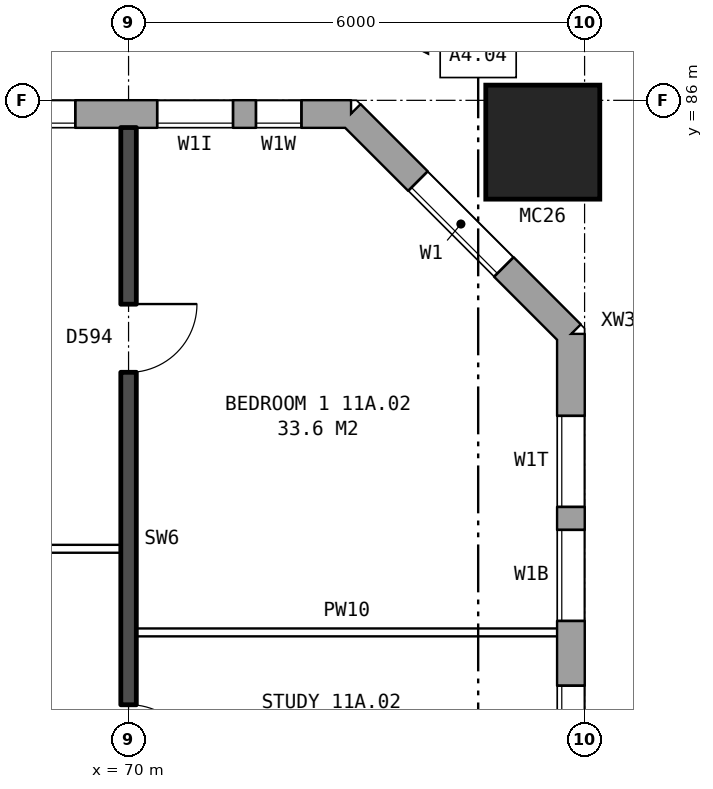
"""IFC4 building model, lengths in metres.
Left out: names, types, materials, properties, quantities, classifications, styles, units other than length and angle.
Written with IfcOpenShell. Run it as: python <this file> out.ifc"""

import sys

from ifc_helpers import new_model, si_unit, direction, frame, frame_2d, origin, origin_2d, place, context, subcontext, project, spatial, rectangle, hollow_rectangle, extrude, element, fill, save


model = new_model("IFC4")
c1 = context("Model", 3, precision=1e-05, world=origin(), true_north=direction((0.0, 1.0)))
c2 = subcontext(c1, "Body", "Model", "MODEL_VIEW")
j1 = project(units=[si_unit("LENGTHUNIT", "METRE"), si_unit("PLANEANGLEUNIT", "RADIAN")], contexts=[c1])
p1 = place(None, origin())
s1 = spatial("IfcSite", under=j1, at=p1, CompositionType="ELEMENT")
p2 = place(p1, origin())
s2 = spatial("IfcBuilding", under=s1, at=p2, CompositionType="ELEMENT")
p3 = place(p2, frame((0.0, 0.0, 44.3)))
s3 = spatial("IfcBuildingStorey", under=s2, at=p3, CompositionType="ELEMENT", Elevation=44.3)
p4 = place(p3, frame((75.45, 85.45, 0.0), z_axis=(0.0, 0.0, 1.0), x_axis=(1.0, 0.0, 0.0)))
e1 = element("IfcColumn", 1, at=p4, inside=s3, PredefinedType="COLUMN", context=c2, shape_type="SweptSolid", body=[
    extrude(hollow_rectangle(XDim=1.5, YDim=1.5, WallThickness=0.08, at=origin_2d()), origin(), (0.0, 0.0, 1.0), 3.1),
])
p5 = place(p3, frame((75.82, 57.075, 0.0), z_axis=(0.0, 0.0, 1.0), x_axis=(0.0, 1.0, 0.0)))
e2 = element("IfcWall", 2, at=p5, inside=s3, PredefinedType="STANDARD", context=c2, shape_type="SweptSolid", body=[
    extrude(rectangle(XDim=25.851, YDim=0.36, at=frame_2d((12.925, 0.0))), origin(), (0.0, 0.0, 1.0), 2.85),
])
p6 = place(p5, frame((1.475, 0.0, 0.8)))
e3 = element("IfcOpeningElement", 3, at=p6, cuts=e2, PredefinedType="OPENING", context=c2, shape_type="SweptSolid", body=[
    extrude(rectangle(XDim=1.0, YDim=1.2, at=frame_2d((0.5, 0.6))), frame((0.0, 0.19, 0.0), z_axis=(0.0, -1.0, 0.0), x_axis=(1.0, 0.0, 0.0)), (0.0, 0.0, 1.0), 0.38),
])
p7 = place(p5, frame((4.625, 0.0, 0.8)))
e4 = element("IfcOpeningElement", 4, at=p7, cuts=e2, PredefinedType="OPENING", context=c2, shape_type="SweptSolid", body=[
    extrude(rectangle(XDim=1.6, YDim=1.8, at=frame_2d((0.8, 0.9))), frame((0.0, 0.19, 0.0), z_axis=(0.0, -1.0, 0.0), x_axis=(1.0, 0.0, 0.0)), (0.0, 0.0, 1.0), 0.38),
])
p8 = place(p5, frame((19.625, 0.0, 0.8)))
e5 = element("IfcOpeningElement", 5, at=p8, cuts=e2, PredefinedType="OPENING", context=c2, shape_type="SweptSolid", body=[
    extrude(rectangle(XDim=1.6, YDim=1.8, at=frame_2d((0.8, 0.9))), frame((0.0, 0.19, 0.0), z_axis=(0.0, -1.0, 0.0), x_axis=(1.0, 0.0, 0.0)), (0.0, 0.0, 1.0), 0.38),
])
p9 = place(p5, frame((22.075, 0.0, 0.8)))
e6 = element("IfcOpeningElement", 6, at=p9, cuts=e2, PredefinedType="OPENING", context=c2, shape_type="SweptSolid", body=[
    extrude(rectangle(XDim=1.2, YDim=1.8, at=frame_2d((0.6, 0.9))), frame((0.0, 0.19, 0.0), z_axis=(0.0, -1.0, 0.0), x_axis=(1.0, 0.0, 0.0)), (0.0, 0.0, 1.0), 0.38),
])
p10 = place(p5, frame((2.775, 0.0, 0.8)))
e7 = element("IfcOpeningElement", 7, at=p10, cuts=e2, PredefinedType="OPENING", context=c2, shape_type="SweptSolid", body=[
    extrude(rectangle(XDim=1.4, YDim=1.8, at=frame_2d((0.7, 0.9))), frame((0.0, 0.19, 0.0), z_axis=(0.0, -1.0, 0.0), x_axis=(1.0, 0.0, 0.0)), (0.0, 0.0, 1.0), 0.38),
])
p11 = place(p5, frame((23.575, 0.0, 0.8)))
e8 = element("IfcOpeningElement", 8, at=p11, cuts=e2, PredefinedType="OPENING", context=c2, shape_type="SweptSolid", body=[
    extrude(rectangle(XDim=1.2, YDim=0.9, at=frame_2d((0.6, 0.45))), frame((0.0, 0.19, 0.0), z_axis=(0.0, -1.0, 0.0), x_axis=(1.0, 0.0, 0.0)), (0.0, 0.0, 1.0), 0.38),
])
p12 = place(p3, frame((75.82, 82.925, 0.0), z_axis=(0.0, 0.0, 1.0), x_axis=(-0.707106781187, 0.707106781187, 0.0)))
e9 = element("IfcWall", 9, at=p12, inside=s3, PredefinedType="STANDARD", context=c2, shape_type="SweptSolid", body=[
    extrude(rectangle(XDim=4.094, YDim=0.36, at=frame_2d((2.047, 0.0))), origin(), (0.0, 0.0, 1.0), 2.85),
])
p13 = place(p12, frame((1.247, 0.0, 0.8)))
e10 = element("IfcOpeningElement", 10, at=p13, cuts=e9, PredefinedType="OPENING", context=c2, shape_type="SweptSolid", body=[
    extrude(rectangle(XDim=1.6, YDim=1.8, at=frame_2d((0.8, 0.9))), frame((0.0, 0.19, 0.0), z_axis=(0.0, -1.0, 0.0), x_axis=(1.0, 0.0, 0.0)), (0.0, 0.0, 1.0), 0.38),
])
p14 = place(p3, frame((72.925, 85.82, 0.0), z_axis=(0.0, 0.0, 1.0), x_axis=(-1.0, 0.0, 0.0)))
e11 = element("IfcWall", 11, at=p14, inside=s3, PredefinedType="STANDARD", context=c2, shape_type="SweptSolid", body=[
    extrude(rectangle(XDim=48.351, YDim=0.36, at=frame_2d((24.175, 0.0))), origin(), (0.0, 0.0, 1.0), 2.85),
])
p15 = place(p14, frame((0.65, 0.0, 0.8)))
e12 = element("IfcOpeningElement", 12, at=p15, cuts=e11, PredefinedType="OPENING", context=c2, shape_type="SweptSolid", body=[
    extrude(rectangle(XDim=0.6, YDim=0.9, at=frame_2d((0.3, 0.45))), frame((0.0, 0.19, 0.0), z_axis=(0.0, -1.0, 0.0), x_axis=(1.0, 0.0, 0.0)), (0.0, 0.0, 1.0), 0.38),
])
p16 = place(p14, frame((3.625, 0.0, 0.8)))
e13 = element("IfcOpeningElement", 13, at=p16, cuts=e11, PredefinedType="OPENING", context=c2, shape_type="SweptSolid", body=[
    extrude(rectangle(XDim=1.6, YDim=1.8, at=frame_2d((0.8, 0.9))), frame((0.0, 0.19, 0.0), z_axis=(0.0, -1.0, 0.0), x_axis=(1.0, 0.0, 0.0)), (0.0, 0.0, 1.0), 0.38),
])
p17 = place(p14, frame((6.625, 0.0, 0.8)))
e14 = element("IfcOpeningElement", 14, at=p17, cuts=e11, PredefinedType="OPENING", context=c2, shape_type="SweptSolid", body=[
    extrude(rectangle(XDim=1.6, YDim=1.8, at=frame_2d((0.8, 0.9))), frame((0.0, 0.19, 0.0), z_axis=(0.0, -1.0, 0.0), x_axis=(1.0, 0.0, 0.0)), (0.0, 0.0, 1.0), 0.38),
])
p18 = place(p14, frame((9.625, 0.0, 0.8)))
e15 = element("IfcOpeningElement", 15, at=p18, cuts=e11, PredefinedType="OPENING", context=c2, shape_type="SweptSolid", body=[
    extrude(rectangle(XDim=1.6, YDim=1.8, at=frame_2d((0.8, 0.9))), frame((0.0, 0.19, 0.0), z_axis=(0.0, -1.0, 0.0), x_axis=(1.0, 0.0, 0.0)), (0.0, 0.0, 1.0), 0.38),
])
p19 = place(p14, frame((12.625, 0.0, 0.8)))
e16 = element("IfcOpeningElement", 16, at=p19, cuts=e11, PredefinedType="OPENING", context=c2, shape_type="SweptSolid", body=[
    extrude(rectangle(XDim=1.6, YDim=1.8, at=frame_2d((0.8, 0.9))), frame((0.0, 0.19, 0.0), z_axis=(0.0, -1.0, 0.0), x_axis=(1.0, 0.0, 0.0)), (0.0, 0.0, 1.0), 0.38),
])
p20 = place(p14, frame((15.625, 0.0, 0.8)))
e17 = element("IfcOpeningElement", 17, at=p20, cuts=e11, PredefinedType="OPENING", context=c2, shape_type="SweptSolid", body=[
    extrude(rectangle(XDim=1.6, YDim=1.8, at=frame_2d((0.8, 0.9))), frame((0.0, 0.19, 0.0), z_axis=(0.0, -1.0, 0.0), x_axis=(1.0, 0.0, 0.0)), (0.0, 0.0, 1.0), 0.38),
])
p21 = place(p14, frame((18.625, 0.0, 0.8)))
e18 = element("IfcOpeningElement", 18, at=p21, cuts=e11, PredefinedType="OPENING", context=c2, shape_type="SweptSolid", body=[
    extrude(rectangle(XDim=1.6, YDim=1.8, at=frame_2d((0.8, 0.9))), frame((0.0, 0.19, 0.0), z_axis=(0.0, -1.0, 0.0), x_axis=(1.0, 0.0, 0.0)), (0.0, 0.0, 1.0), 0.38),
])
p22 = place(p14, frame((21.625, 0.0, 0.8)))
e19 = element("IfcOpeningElement", 19, at=p22, cuts=e11, PredefinedType="OPENING", context=c2, shape_type="SweptSolid", body=[
    extrude(rectangle(XDim=1.6, YDim=1.8, at=frame_2d((0.8, 0.9))), frame((0.0, 0.19, 0.0), z_axis=(0.0, -1.0, 0.0), x_axis=(1.0, 0.0, 0.0)), (0.0, 0.0, 1.0), 0.38),
])
p23 = place(p14, frame((24.625, 0.0, 0.8)))
e20 = element("IfcOpeningElement", 20, at=p23, cuts=e11, PredefinedType="OPENING", context=c2, shape_type="SweptSolid", body=[
    extrude(rectangle(XDim=1.6, YDim=1.8, at=frame_2d((0.8, 0.9))), frame((0.0, 0.19, 0.0), z_axis=(0.0, -1.0, 0.0), x_axis=(1.0, 0.0, 0.0)), (0.0, 0.0, 1.0), 0.38),
])
p24 = place(p14, frame((27.625, 0.0, 0.8)))
e21 = element("IfcOpeningElement", 21, at=p24, cuts=e11, PredefinedType="OPENING", context=c2, shape_type="SweptSolid", body=[
    extrude(rectangle(XDim=1.6, YDim=1.8, at=frame_2d((0.8, 0.9))), frame((0.0, 0.19, 0.0), z_axis=(0.0, -1.0, 0.0), x_axis=(1.0, 0.0, 0.0)), (0.0, 0.0, 1.0), 0.38),
])
p25 = place(p14, frame((30.625, 0.0, 0.8)))
e22 = element("IfcOpeningElement", 22, at=p25, cuts=e11, PredefinedType="OPENING", context=c2, shape_type="SweptSolid", body=[
    extrude(rectangle(XDim=1.6, YDim=1.8, at=frame_2d((0.8, 0.9))), frame((0.0, 0.19, 0.0), z_axis=(0.0, -1.0, 0.0), x_axis=(1.0, 0.0, 0.0)), (0.0, 0.0, 1.0), 0.38),
])
p26 = place(p14, frame((33.625, 0.0, 0.8)))
e23 = element("IfcOpeningElement", 23, at=p26, cuts=e11, PredefinedType="OPENING", context=c2, shape_type="SweptSolid", body=[
    extrude(rectangle(XDim=1.6, YDim=1.8, at=frame_2d((0.8, 0.9))), frame((0.0, 0.19, 0.0), z_axis=(0.0, -1.0, 0.0), x_axis=(1.0, 0.0, 0.0)), (0.0, 0.0, 1.0), 0.38),
])
p27 = place(p14, frame((36.625, 0.0, 0.8)))
e24 = element("IfcOpeningElement", 24, at=p27, cuts=e11, PredefinedType="OPENING", context=c2, shape_type="SweptSolid", body=[
    extrude(rectangle(XDim=1.6, YDim=1.8, at=frame_2d((0.8, 0.9))), frame((0.0, 0.19, 0.0), z_axis=(0.0, -1.0, 0.0), x_axis=(1.0, 0.0, 0.0)), (0.0, 0.0, 1.0), 0.38),
])
p28 = place(p14, frame((39.625, 0.0, 0.8)))
e25 = element("IfcOpeningElement", 25, at=p28, cuts=e11, PredefinedType="OPENING", context=c2, shape_type="SweptSolid", body=[
    extrude(rectangle(XDim=1.6, YDim=1.8, at=frame_2d((0.8, 0.9))), frame((0.0, 0.19, 0.0), z_axis=(0.0, -1.0, 0.0), x_axis=(1.0, 0.0, 0.0)), (0.0, 0.0, 1.0), 0.38),
])
p29 = place(p14, frame((42.625, 0.0, 0.8)))
e26 = element("IfcOpeningElement", 26, at=p29, cuts=e11, PredefinedType="OPENING", context=c2, shape_type="SweptSolid", body=[
    extrude(rectangle(XDim=1.6, YDim=1.8, at=frame_2d((0.8, 0.9))), frame((0.0, 0.19, 0.0), z_axis=(0.0, -1.0, 0.0), x_axis=(1.0, 0.0, 0.0)), (0.0, 0.0, 1.0), 0.38),
])
p30 = place(p14, frame((45.125, 0.0, 0.8)))
e27 = element("IfcOpeningElement", 27, at=p30, cuts=e11, PredefinedType="OPENING", context=c2, shape_type="SweptSolid", body=[
    extrude(rectangle(XDim=1.2, YDim=1.8, at=frame_2d((0.6, 0.9))), frame((0.0, 0.19, 0.0), z_axis=(0.0, -1.0, 0.0), x_axis=(1.0, 0.0, 0.0)), (0.0, 0.0, 1.0), 0.38),
])
p31 = place(p14, frame((1.55, 0.0, 0.8)))
e28 = element("IfcOpeningElement", 28, at=p31, cuts=e11, PredefinedType="OPENING", context=c2, shape_type="SweptSolid", body=[
    extrude(rectangle(XDim=1.0, YDim=1.5, at=frame_2d((0.5, 0.75))), frame((0.0, 0.19, 0.0), z_axis=(0.0, -1.0, 0.0), x_axis=(1.0, 0.0, 0.0)), (0.0, 0.0, 1.0), 0.38),
])
p32 = place(p14, frame((46.625, 0.0, 0.8)))
e29 = element("IfcOpeningElement", 29, at=p32, cuts=e11, PredefinedType="OPENING", context=c2, shape_type="SweptSolid", body=[
    extrude(rectangle(XDim=1.0, YDim=0.9, at=frame_2d((0.5, 0.45))), frame((0.0, 0.19, 0.0), z_axis=(0.0, -1.0, 0.0), x_axis=(1.0, 0.0, 0.0)), (0.0, 0.0, 1.0), 0.38),
])
p33 = place(p3, frame((70.1, 79.0, 0.0), z_axis=(0.0, 0.0, 1.0), x_axis=(1.0, 0.0, 0.0)))
e30 = element("IfcWall", 30, at=p33, inside=s3, PredefinedType="PARTITIONING", context=c2, shape_type="SweptSolid", body=[
    extrude(rectangle(XDim=5.54, YDim=0.1, at=frame_2d((2.77, 0.0))), origin(), (0.0, 0.0, 1.0), 2.85),
])
p34 = place(p3, frame((64.1, 80.1, 0.0), z_axis=(0.0, 0.0, 1.0), x_axis=(1.0, 0.0, 0.0)))
e31 = element("IfcWall", 31, at=p34, inside=s3, PredefinedType="PARTITIONING", context=c2, shape_type="SweptSolid", body=[
    extrude(rectangle(XDim=5.8, YDim=0.1, at=frame_2d((2.9, 0.0))), origin(), (0.0, 0.0, 1.0), 2.85),
])
p35 = place(p34, frame((3.6, 0.0, 0.0)))
e32 = element("IfcOpeningElement", 32, at=p35, cuts=e31, PredefinedType="OPENING", context=c2, shape_type="SweptSolid", body=[
    extrude(rectangle(XDim=0.9, YDim=2.1, at=frame_2d((0.45, 1.05))), frame((0.0, 0.06, 0.0), z_axis=(0.0, -1.0, 0.0), x_axis=(1.0, 0.0, 0.0)), (0.0, 0.0, 1.0), 0.12),
])
p36 = place(p34, frame((0.7, 0.0, 0.0)))
e33 = element("IfcOpeningElement", 33, at=p36, cuts=e31, PredefinedType="OPENING", context=c2, shape_type="SweptSolid", body=[
    extrude(rectangle(XDim=0.9, YDim=2.1, at=frame_2d((0.45, 1.05))), frame((0.0, 0.06, 0.0), z_axis=(0.0, -1.0, 0.0), x_axis=(1.0, 0.0, 0.0)), (0.0, 0.0, 1.0), 0.12),
])
p37 = place(p3, frame((70.0, 76.2, 0.0), z_axis=(0.0, 0.0, 1.0), x_axis=(0.0, 1.0, 0.0)))
e34 = element("IfcWall", 34, at=p37, inside=s3, PredefinedType="SOLIDWALL", context=c2, shape_type="SweptSolid", body=[
    extrude(rectangle(XDim=9.44, YDim=0.2, at=frame_2d((4.72, 0.0))), origin(), (0.0, 0.0, 1.0), 2.85),
])
p38 = place(p37, frame((6.22, 0.0, 0.0)))
e35 = element("IfcOpeningElement", 35, at=p38, cuts=e34, PredefinedType="OPENING", context=c2, shape_type="SweptSolid", body=[
    extrude(rectangle(XDim=0.9, YDim=2.1, at=frame_2d((0.45, 1.05))), frame((0.0, 0.11, 0.0), z_axis=(0.0, -1.0, 0.0), x_axis=(1.0, 0.0, 0.0)), (0.0, 0.0, 1.0), 0.22),
])
p39 = place(p37, frame((0.95, 0.0, 0.0)))
e36 = element("IfcOpeningElement", 36, at=p39, cuts=e34, PredefinedType="OPENING", context=c2, shape_type="SweptSolid", body=[
    extrude(rectangle(XDim=0.9, YDim=2.1, at=frame_2d((0.45, 1.05))), frame((0.0, 0.11, 0.0), z_axis=(0.0, -1.0, 0.0), x_axis=(1.0, 0.0, 0.0)), (0.0, 0.0, 1.0), 0.22),
])
p40 = place(p8, origin())
e37 = element("IfcWindow", 37, at=p40, inside=s3, PartitioningType="SINGLE_PANEL", PredefinedType="WINDOW", context=c2, shape_type="SweptSolid", body=[
    extrude(rectangle(XDim=1.6, YDim=1.8, at=frame_2d((0.8, 0.9))), frame((0.0, 0.15, 0.0), z_axis=(0.0, -1.0, 0.0), x_axis=(1.0, 0.0, 0.0)), (0.0, 0.0, 1.0), 0.06),
])
fill(e5, e37)
p41 = place(p9, origin())
e38 = element("IfcWindow", 38, at=p41, inside=s3, PartitioningType="SINGLE_PANEL", PredefinedType="WINDOW", context=c2, shape_type="SweptSolid", body=[
    extrude(rectangle(XDim=1.2, YDim=1.8, at=frame_2d((0.6, 0.9))), frame((0.0, 0.15, 0.0), z_axis=(0.0, -1.0, 0.0), x_axis=(1.0, 0.0, 0.0)), (0.0, 0.0, 1.0), 0.06),
])
fill(e6, e38)
p42 = place(p13, origin())
e39 = element("IfcWindow", 39, at=p42, inside=s3, PartitioningType="SINGLE_PANEL", PredefinedType="WINDOW", context=c2, shape_type="SweptSolid", body=[
    extrude(rectangle(XDim=1.6, YDim=1.8, at=frame_2d((0.8, 0.9))), frame((0.0, 0.15, 0.0), z_axis=(0.0, -1.0, 0.0), x_axis=(1.0, 0.0, 0.0)), (0.0, 0.0, 1.0), 0.06),
])
fill(e10, e39)
p43 = place(p15, origin())
e40 = element("IfcWindow", 40, at=p43, inside=s3, PartitioningType="SINGLE_PANEL", PredefinedType="WINDOW", context=c2, shape_type="SweptSolid", body=[
    extrude(rectangle(XDim=0.6, YDim=0.9, at=frame_2d((0.3, 0.45))), frame((0.0, 0.15, 0.0), z_axis=(0.0, -1.0, 0.0), x_axis=(1.0, 0.0, 0.0)), (0.0, 0.0, 1.0), 0.06),
])
fill(e12, e40)
p44 = place(p16, origin())
e41 = element("IfcWindow", 41, at=p44, inside=s3, PartitioningType="SINGLE_PANEL", PredefinedType="WINDOW", context=c2, shape_type="SweptSolid", body=[
    extrude(rectangle(XDim=1.6, YDim=1.8, at=frame_2d((0.8, 0.9))), frame((0.0, 0.15, 0.0), z_axis=(0.0, -1.0, 0.0), x_axis=(1.0, 0.0, 0.0)), (0.0, 0.0, 1.0), 0.06),
])
fill(e13, e41)
p45 = place(p38, frame((0.9, 0.0, 0.0), z_axis=(0.0, 0.0, 1.0), x_axis=(-1.0, 0.0, 0.0)))
e42 = element("IfcDoor", 42, at=p45, inside=s3, OperationType="SINGLE_SWING_LEFT", PredefinedType="DOOR", context=c2, shape_type="SweptSolid", body=[
    extrude(rectangle(XDim=0.9, YDim=2.1, at=frame_2d((0.45, 1.05))), frame((0.0, 0.025, 0.0), z_axis=(0.0, -1.0, 0.0), x_axis=(1.0, 0.0, 0.0)), (0.0, 0.0, 1.0), 0.05),
])
fill(e35, e42)
p46 = place(p39, frame((0.9, 0.0, 0.0), z_axis=(0.0, 0.0, 1.0), x_axis=(-1.0, 0.0, 0.0)))
e43 = element("IfcDoor", 43, at=p46, inside=s3, OperationType="SINGLE_SWING_RIGHT", PredefinedType="DOOR", context=c2, shape_type="SweptSolid", body=[
    extrude(rectangle(XDim=0.9, YDim=2.1, at=frame_2d((0.45, 1.05))), frame((0.0, 0.025, 0.0), z_axis=(0.0, -1.0, 0.0), x_axis=(1.0, 0.0, 0.0)), (0.0, 0.0, 1.0), 0.05),
])
fill(e36, e43)
p47 = place(p11, origin())
e44 = element("IfcWindow", 44, at=p47, inside=s3, PartitioningType="SINGLE_PANEL", PredefinedType="WINDOW", context=c2, shape_type="SweptSolid", body=[
    extrude(rectangle(XDim=1.2, YDim=0.9, at=frame_2d((0.6, 0.45))), frame((0.0, 0.15, 0.0), z_axis=(0.0, -1.0, 0.0), x_axis=(1.0, 0.0, 0.0)), (0.0, 0.0, 1.0), 0.06),
])
fill(e8, e44)
p48 = place(p31, origin())
e45 = element("IfcWindow", 45, at=p48, inside=s3, PartitioningType="SINGLE_PANEL", PredefinedType="WINDOW", context=c2, shape_type="SweptSolid", body=[
    extrude(rectangle(XDim=1.0, YDim=1.5, at=frame_2d((0.5, 0.75))), frame((0.0, 0.15, 0.0), z_axis=(0.0, -1.0, 0.0), x_axis=(1.0, 0.0, 0.0)), (0.0, 0.0, 1.0), 0.06),
])
fill(e28, e45)
save(model, sys.argv[1])
